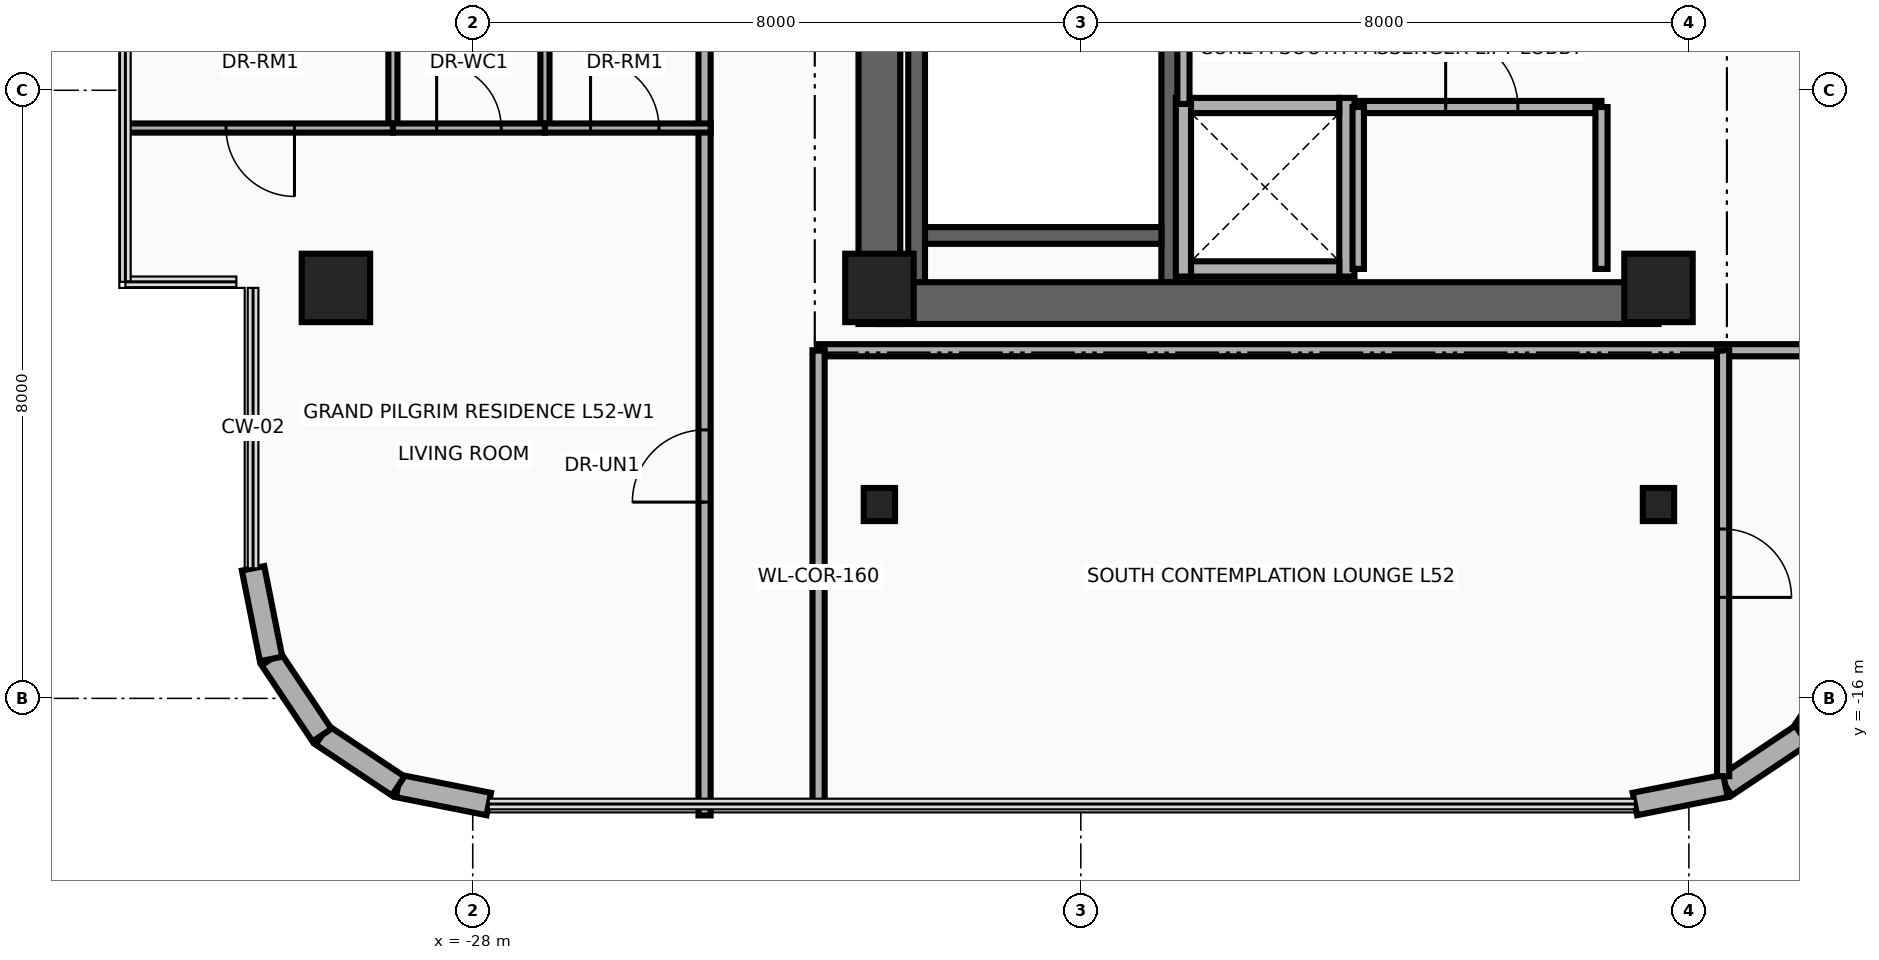
"""IFC4 building model, lengths in metres.
Left out: names, types, materials, properties, quantities, classifications, styles, units other than length and angle.
Written with IfcOpenShell. Run it as: python <this file> out.ifc"""

import sys

from ifc_helpers import new_model, si_unit, direction, frame, frame_2d, origin, origin_2d, place, context, subcontext, project, spatial, rectangle, i_section, extrude, source, transform, mapped, element, fill, save


model = new_model("IFC4")
c1 = context("Model", 3, precision=1e-05, world=origin(), true_north=direction((0.0, 1.0)))
c2 = subcontext(c1, "Body", "Model", "MODEL_VIEW")
j1 = project(units=[si_unit("LENGTHUNIT", "METRE"), si_unit("PLANEANGLEUNIT", "RADIAN")], contexts=[c1])
p1 = place(None, origin())
s1 = spatial("IfcSite", under=j1, at=p1, CompositionType="ELEMENT")
p2 = place(p1, origin())
s2 = spatial("IfcBuilding", under=s1, at=p2, CompositionType="ELEMENT")
p3 = place(p2, frame((0.0, 0.0, 205.5)))
s3 = spatial("IfcBuildingStorey", under=s2, at=p3, CompositionType="ELEMENT", Elevation=205.5)
for number, where, z_axis, x_axis in (
    (1, (-22.16, -10.525, 0.0), (0.0, 0.0, 1.0), (0.0, 1.0, 0.0)),
    (2, (-18.83, -10.525, 0.0), (0.0, 0.0, 1.0), (0.0, 1.0, 0.0)),
):
    element("IfcWall", number, at=place(p3, frame(where, z_axis=z_axis, x_axis=x_axis)), inside=s3, PredefinedType="SHEAR", context=c2, shape_type="SweptSolid", body=[
        extrude(rectangle(XDim=8.745, YDim=0.22, at=frame_2d((4.373, 0.0))), origin(), (0.0, 0.0, 1.0), 3.26),
    ])
p4 = place(p3, frame((-22.05, -9.91, 0.0), z_axis=(0.0, 0.0, 1.0), x_axis=(1.0, 0.0, 0.0)))
e3 = element("IfcWall", 3, at=p4, inside=s3, PredefinedType="SHEAR", context=c2, shape_type="SweptSolid", body=[
    extrude(rectangle(XDim=3.11, YDim=0.22, at=frame_2d((1.555, 0.0))), origin(), (0.0, 0.0, 1.0), 3.26),
])
p5 = place(p3, frame((-22.65, -11.075, 0.0), z_axis=(0.0, 0.0, 1.0), x_axis=(0.0, 1.0, 0.0)))
e4 = element("IfcWall", 4, at=p5, inside=s3, PredefinedType="SHEAR", context=c2, shape_type="SweptSolid", body=[
    extrude(rectangle(XDim=22.15, YDim=0.55, at=frame_2d((11.075, 0.0))), origin(), (0.0, 0.0, 1.0), 3.26),
])
p6 = place(p3, frame((-22.65, -10.8, 0.0), z_axis=(0.0, 0.0, 1.0), x_axis=(1.0, 0.0, 0.0)))
e5 = element("IfcWall", 5, at=p6, inside=s3, PredefinedType="SHEAR", context=c2, shape_type="SweptSolid", body=[
    extrude(rectangle(XDim=10.25, YDim=0.55, at=frame_2d((5.125, 0.0))), origin(), (0.0, 0.0, 1.0), 3.26),
])
m1 = source(origin(), c2, "Body", "SweptSolid", [
    extrude(rectangle(XDim=0.9, YDim=0.9, at=origin_2d()), origin(), (0.0, 0.0, 1.0), 3.5),
])
for number, where, z_axis, x_axis in (
    (6, (-29.8, -10.6, 0.0), (0.0, 0.0, 1.0), (1.0, 0.0, 0.0)),
    (7, (-22.65, -10.6, 0.0), (0.0, 0.0, 1.0), (1.0, 0.0, 0.0)),
    (8, (-12.4, -10.6, 0.0), (0.0, 0.0, 1.0), (1.0, 0.0, 0.0)),
):
    element("IfcColumn", number, at=place(p3, frame(where, z_axis=z_axis, x_axis=x_axis)), inside=s3, PredefinedType="COLUMN", context=c2, shape_type="MappedRepresentation", body=[
        mapped(m1, transform((0.0, 0.0, 0.0), x_axis=(1.0, 0.0, 0.0), y_axis=(0.0, 1.0, 0.0), z_axis=(0.0, 0.0, 1.0), scale=1.0)),
    ])
m2 = source(origin(), c2, "Body", "SweptSolid", [
    extrude(i_section(OverallWidth=0.412, OverallDepth=0.435, WebThickness=0.036, FlangeThickness=0.057, at=origin_2d()), origin(), (0.0, 0.0, 1.0), 3.5),
])
for number, where, z_axis, x_axis in (
    (9, (-22.65, -13.45, 0.0), (0.0, 0.0, 1.0), (1.0, 0.0, 0.0)),
    (10, (-12.4, -13.45, 0.0), (0.0, 0.0, 1.0), (1.0, 0.0, 0.0)),
):
    element("IfcColumn", number, at=place(p3, frame(where, z_axis=z_axis, x_axis=x_axis)), inside=s3, PredefinedType="COLUMN", context=c2, shape_type="MappedRepresentation", body=[
        mapped(m2, transform((0.0, 0.0, 0.0), x_axis=(1.0, 0.0, 0.0), y_axis=(0.0, 1.0, 0.0), z_axis=(0.0, 0.0, 1.0), scale=1.0)),
    ])
for number, where, z_axis, x_axis in (
    (11, (-9.847, -15.482, 0.0), (0.0, 0.0, 1.0), (-0.556, -0.831, 0.0)),
    (12, (-10.517, -16.483, 0.0), (0.0, 0.0, 1.0), (-0.831, -0.556, 0.0)),
):
    element("IfcWall", number, at=place(p3, frame(where, z_axis=z_axis, x_axis=x_axis)), inside=s3, PredefinedType="SOLIDWALL", context=c2, shape_type="SweptSolid", body=[
        extrude(rectangle(XDim=1.205, YDim=0.3, at=frame_2d((0.603, 0.0))), origin(), (0.0, 0.0, 1.0), 3.26),
    ])
for number, where, z_axis, x_axis in (
    (13, (-11.518, -17.153, 0.0), (0.0, 0.0, 1.0), (-0.981, -0.195, 0.0)),
    (14, (-27.789, -17.39, 0.0), (0.0, 0.0, 1.0), (-0.981, 0.195, 0.0)),
):
    element("IfcWall", number, at=place(p3, frame(where, z_axis=z_axis, x_axis=x_axis)), inside=s3, PredefinedType="SOLIDWALL", context=c2, shape_type="SweptSolid", body=[
        extrude(rectangle(XDim=1.216, YDim=0.3, at=frame_2d((0.608, 0.0))), origin(), (0.0, 0.0, 1.0), 3.26),
    ])
for number, where, z_axis, x_axis in (
    (15, (-28.982, -17.153, 0.0), (0.0, 0.0, 1.0), (-0.831, 0.556, 0.0)),
    (16, (-29.983, -16.483, 0.0), (0.0, 0.0, 1.0), (-0.556, 0.831, 0.0)),
):
    element("IfcWall", number, at=place(p3, frame(where, z_axis=z_axis, x_axis=x_axis)), inside=s3, PredefinedType="SOLIDWALL", context=c2, shape_type="SweptSolid", body=[
        extrude(rectangle(XDim=1.205, YDim=0.3, at=frame_2d((0.603, 0.0))), origin(), (0.0, 0.0, 1.0), 3.26),
    ])
p7 = place(p3, frame((-30.653, -15.482, 0.0), z_axis=(0.0, 0.0, 1.0), x_axis=(-0.194996050505, 0.980804027463, 0.0)))
e17 = element("IfcWall", 17, at=p7, inside=s3, PredefinedType="SOLIDWALL", context=c2, shape_type="SweptSolid", body=[
    extrude(rectangle(XDim=1.216, YDim=0.3, at=frame_2d((0.608, 0.0))), origin(), (0.0, 0.0, 1.0), 3.26),
])
for number, where, z_axis, x_axis in (
    (18, (-18.65, -10.45, 0.0), (0.0, 0.0, 1.0), (0.0, 1.0, 0.0)),
    (19, (-16.5, -10.45, 0.0), (0.0, 0.0, 1.0), (0.0, 1.0, 0.0)),
):
    element("IfcWall", number, at=place(p3, frame(where, z_axis=z_axis, x_axis=x_axis)), inside=s3, PredefinedType="MOVABLE", context=c2, shape_type="SweptSolid", body=[
        extrude(rectangle(XDim=2.35, YDim=0.2, at=frame_2d((1.175, 0.0))), origin(), (0.0, 0.0, 1.0), 2.544),
    ])
p8 = place(p3, frame((-18.55, -10.35, 0.0), z_axis=(0.0, 0.0, 1.0), x_axis=(1.0, 0.0, 0.0)))
e20 = element("IfcWall", 20, at=p8, inside=s3, PredefinedType="MOVABLE", context=c2, shape_type="SweptSolid", body=[
    extrude(rectangle(XDim=1.95, YDim=0.2, at=frame_2d((0.975, 0.0))), origin(), (0.0, 0.0, 1.0), 2.544),
])
p9 = place(p3, frame((-18.55, -8.2, 0.0), z_axis=(0.0, 0.0, 1.0), x_axis=(1.0, 0.0, 0.0)))
e21 = element("IfcWall", 21, at=p9, inside=s3, PredefinedType="MOVABLE", context=c2, shape_type="SweptSolid", body=[
    extrude(rectangle(XDim=1.95, YDim=0.2, at=frame_2d((0.975, 0.0))), origin(), (0.0, 0.0, 1.0), 3.26),
])
p10 = place(p3, frame((-18.65, -8.18, 0.0), z_axis=(0.0, 0.0, 1.0), x_axis=(0.0, 1.0, 0.0)))
e22 = element("IfcWall", 22, at=p10, inside=s3, PredefinedType="PARTITIONING", context=c2, shape_type="SweptSolid", body=[
    extrude(rectangle(XDim=1.56, YDim=0.16, at=frame_2d((0.78, 0.0))), origin(), (0.0, 0.0, 1.0), 3.26),
])
p11 = place(p3, frame((-16.35, -8.22, 0.0), z_axis=(0.0, 0.0, 1.0), x_axis=(1.0, 0.0, 0.0)))
e23 = element("IfcWall", 23, at=p11, inside=s3, PredefinedType="PARTITIONING", context=c2, shape_type="SweptSolid", body=[
    extrude(rectangle(XDim=3.2, YDim=0.16, at=frame_2d((1.6, 0.0))), origin(), (0.0, 0.0, 1.0), 3.26),
])
p12 = place(p11, frame((1.15, 0.0, 0.0)))
e24 = element("IfcOpeningElement", 24, at=p12, cuts=e23, PredefinedType="OPENING", context=c2, shape_type="SweptSolid", body=[
    extrude(rectangle(XDim=0.95, YDim=2.15, at=frame_2d((0.475, 1.075))), frame((0.0, 0.095, 0.0), z_axis=(0.0, -1.0, 0.0), x_axis=(1.0, 0.0, 0.0)), (0.0, 0.0, 1.0), 0.19),
])
p13 = place(p3, frame((-16.35, -10.35, 0.0), z_axis=(0.0, 0.0, 1.0), x_axis=(0.0, 1.0, 0.0)))
e25 = element("IfcWall", 25, at=p13, inside=s3, PredefinedType="PARTITIONING", context=c2, shape_type="SweptSolid", body=[
    extrude(rectangle(XDim=2.13, YDim=0.15, at=frame_2d((1.065, 0.0))), origin(), (0.0, 0.0, 1.0), 3.26),
])
p14 = place(p3, frame((-13.15, -10.35, 0.0), z_axis=(0.0, 0.0, 1.0), x_axis=(0.0, 1.0, 0.0)))
e26 = element("IfcWall", 26, at=p14, inside=s3, PredefinedType="PARTITIONING", context=c2, shape_type="SweptSolid", body=[
    extrude(rectangle(XDim=2.13, YDim=0.16, at=frame_2d((1.065, 0.0))), origin(), (0.0, 0.0, 1.0), 3.26),
])
p15 = place(p3, frame((-23.45, -11.42, 0.0), z_axis=(0.0, 0.0, 1.0), x_axis=(1.0, 0.0, 0.0)))
e27 = element("IfcWall", 27, at=p15, inside=s3, PredefinedType="PARTITIONING", context=c2, shape_type="SweptSolid", body=[
    extrude(rectangle(XDim=13.84, YDim=0.16, at=frame_2d((6.92, 0.0))), origin(), (0.0, 0.0, 1.0), 2.634),
])
p16 = place(p3, frame((-23.45, -17.39, 0.0), z_axis=(0.0, 0.0, 1.0), x_axis=(0.0, 1.0, 0.0)))
e28 = element("IfcWall", 28, at=p16, inside=s3, PredefinedType="PARTITIONING", context=c2, shape_type="SweptSolid", body=[
    extrude(rectangle(XDim=5.97, YDim=0.16, at=frame_2d((2.985, 0.0))), origin(), (0.0, 0.0, 1.0), 3.26),
])
p17 = place(p3, frame((-24.95, -17.54, 0.0), z_axis=(0.0, 0.0, 1.0), x_axis=(0.0, 1.0, 0.0)))
e29 = element("IfcWall", 29, at=p17, inside=s3, PredefinedType="PARTITIONING", context=c2, shape_type="SweptSolid", body=[
    extrude(rectangle(XDim=26.34, YDim=0.16, at=frame_2d((13.17, 0.0))), origin(), (0.0, 0.0, 1.0), 2.544),
])
p18 = place(p17, frame((4.122, 0.0, 0.0)))
e30 = element("IfcOpeningElement", 30, at=p18, cuts=e29, PredefinedType="OPENING", context=c2, shape_type="SweptSolid", body=[
    extrude(rectangle(XDim=0.95, YDim=2.15, at=frame_2d((0.475, 1.075))), frame((0.0, 0.095, 0.0), z_axis=(0.0, -1.0, 0.0), x_axis=(1.0, 0.0, 0.0)), (0.0, 0.0, 1.0), 0.19),
])
p19 = place(p17, frame((18.383, 0.0, 0.0)))
e31 = element("IfcOpeningElement", 31, at=p19, cuts=e29, PredefinedType="OPENING", context=c2, shape_type="SweptSolid", body=[
    extrude(rectangle(XDim=0.9, YDim=2.1, at=frame_2d((0.45, 1.05))), frame((0.0, 0.095, 0.0), z_axis=(0.0, -1.0, 0.0), x_axis=(1.0, 0.0, 0.0)), (0.0, 0.0, 1.0), 0.19),
])
p20 = place(p17, frame((23.388, 0.0, 0.0)))
e32 = element("IfcOpeningElement", 32, at=p20, cuts=e29, PredefinedType="OPENING", context=c2, shape_type="SweptSolid", body=[
    extrude(rectangle(XDim=0.9, YDim=2.1, at=frame_2d((0.45, 1.05))), frame((0.0, 0.095, 0.0), z_axis=(0.0, -1.0, 0.0), x_axis=(1.0, 0.0, 0.0)), (0.0, 0.0, 1.0), 0.19),
])
for number, where, z_axis, x_axis in (
    (33, (-27.05, -8.497, 0.0), (0.0, 0.0, 1.0), (0.0, 1.0, 0.0)),
    (34, (-29.05, -8.497, 0.0), (0.0, 0.0, 1.0), (0.0, 1.0, 0.0)),
):
    element("IfcWall", number, at=place(p3, frame(where, z_axis=z_axis, x_axis=x_axis)), inside=s3, PredefinedType="PARTITIONING", context=c2, shape_type="SweptSolid", body=[
        extrude(rectangle(XDim=7.288, YDim=0.12, at=frame_2d((3.644, 0.0))), origin(), (0.0, 0.0, 1.0), 2.544),
    ])
p21 = place(p3, frame((-29.05, -8.497, 0.0), z_axis=(0.0, 0.0, 1.0), x_axis=(1.0, 0.0, 0.0)))
e35 = element("IfcWall", 35, at=p21, inside=s3, PredefinedType="PARTITIONING", context=c2, shape_type="SweptSolid", body=[
    extrude(rectangle(XDim=2.0, YDim=0.12, at=frame_2d((1.0, 0.0))), origin(), (0.0, 0.0, 1.0), 2.788),
])
p22 = place(p21, frame((0.575, 0.0, 0.0)))
e36 = element("IfcOpeningElement", 36, at=p22, cuts=e35, PredefinedType="OPENING", context=c2, shape_type="SweptSolid", body=[
    extrude(rectangle(XDim=0.85, YDim=2.1, at=frame_2d((0.425, 1.05))), frame((0.0, 0.075, 0.0), z_axis=(0.0, -1.0, 0.0), x_axis=(1.0, 0.0, 0.0)), (0.0, 0.0, 1.0), 0.15),
])
p23 = place(p3, frame((-27.05, -8.497, 0.0), z_axis=(0.0, 0.0, 1.0), x_axis=(1.0, 0.0, 0.0)))
e37 = element("IfcWall", 37, at=p23, inside=s3, PredefinedType="PARTITIONING", context=c2, shape_type="SweptSolid", body=[
    extrude(rectangle(XDim=2.18, YDim=0.12, at=frame_2d((1.09, 0.0))), origin(), (0.0, 0.0, 1.0), 2.788),
])
p24 = place(p23, frame((0.6, 0.0, 0.0)))
e38 = element("IfcOpeningElement", 38, at=p24, cuts=e37, PredefinedType="OPENING", context=c2, shape_type="SweptSolid", body=[
    extrude(rectangle(XDim=0.9, YDim=2.1, at=frame_2d((0.45, 1.05))), frame((0.0, 0.075, 0.0), z_axis=(0.0, -1.0, 0.0), x_axis=(1.0, 0.0, 0.0)), (0.0, 0.0, 1.0), 0.15),
])
p25 = place(p3, frame((-32.54, -8.497, 0.0), z_axis=(0.0, 0.0, 1.0), x_axis=(1.0, 0.0, 0.0)))
e39 = element("IfcWall", 39, at=p25, inside=s3, PredefinedType="PARTITIONING", context=c2, shape_type="SweptSolid", body=[
    extrude(rectangle(XDim=3.49, YDim=0.12, at=frame_2d((1.745, 0.0))), origin(), (0.0, 0.0, 1.0), 2.706),
])
p26 = place(p25, frame((1.295, 0.0, 0.0)))
e40 = element("IfcOpeningElement", 40, at=p26, cuts=e39, PredefinedType="OPENING", context=c2, shape_type="SweptSolid", body=[
    extrude(rectangle(XDim=0.9, YDim=2.1, at=frame_2d((0.45, 1.05))), frame((0.0, 0.075, 0.0), z_axis=(0.0, -1.0, 0.0), x_axis=(1.0, 0.0, 0.0)), (0.0, 0.0, 1.0), 0.15),
])
p27 = place(p3, frame((-11.55, -17.024, 0.0), z_axis=(0.0, 0.0, 1.0), x_axis=(0.0, 1.0, 0.0)))
e41 = element("IfcWall", 41, at=p27, inside=s3, PredefinedType="PARTITIONING", context=c2, shape_type="SweptSolid", body=[
    extrude(rectangle(XDim=5.604, YDim=0.16, at=frame_2d((2.802, 0.0))), origin(), (0.0, 0.0, 1.0), 3.26),
])
p28 = place(p27, frame((2.352, 0.0, 0.0)))
e42 = element("IfcOpeningElement", 42, at=p28, cuts=e41, PredefinedType="OPENING", context=c2, shape_type="SweptSolid", body=[
    extrude(rectangle(XDim=0.9, YDim=2.1, at=frame_2d((0.45, 1.05))), frame((0.0, 0.095, 0.0), z_axis=(0.0, -1.0, 0.0), x_axis=(1.0, 0.0, 0.0)), (0.0, 0.0, 1.0), 0.19),
])
p29 = place(p12, origin())
e43 = element("IfcDoor", 43, at=p29, inside=s3, OperationType="SINGLE_SWING_LEFT", PredefinedType="DOOR", context=c2, shape_type="SweptSolid", body=[
    extrude(rectangle(XDim=0.95, YDim=2.15, at=frame_2d((0.475, 1.075))), frame((0.0, 0.025, 0.0), z_axis=(0.0, -1.0, 0.0), x_axis=(1.0, 0.0, 0.0)), (0.0, 0.0, 1.0), 0.05),
])
fill(e24, e43)
p30 = place(p18, origin())
e44 = element("IfcDoor", 44, at=p30, inside=s3, OperationType="SINGLE_SWING_RIGHT", PredefinedType="DOOR", context=c2, shape_type="SweptSolid", body=[
    extrude(rectangle(XDim=0.95, YDim=2.15, at=frame_2d((0.475, 1.075))), frame((0.0, 0.025, 0.0), z_axis=(0.0, -1.0, 0.0), x_axis=(1.0, 0.0, 0.0)), (0.0, 0.0, 1.0), 0.05),
])
fill(e30, e44)
p31 = place(p22, origin())
e45 = element("IfcDoor", 45, at=p31, inside=s3, OperationType="SINGLE_SWING_LEFT", PredefinedType="DOOR", context=c2, shape_type="SweptSolid", body=[
    extrude(rectangle(XDim=0.85, YDim=2.1, at=frame_2d((0.425, 1.05))), frame((0.0, 0.025, 0.0), z_axis=(0.0, -1.0, 0.0), x_axis=(1.0, 0.0, 0.0)), (0.0, 0.0, 1.0), 0.05),
])
fill(e36, e45)
p32 = place(p24, origin())
e46 = element("IfcDoor", 46, at=p32, inside=s3, OperationType="SINGLE_SWING_RIGHT", PredefinedType="DOOR", context=c2, shape_type="SweptSolid", body=[
    extrude(rectangle(XDim=0.9, YDim=2.1, at=frame_2d((0.45, 1.05))), frame((0.0, 0.025, 0.0), z_axis=(0.0, -1.0, 0.0), x_axis=(1.0, 0.0, 0.0)), (0.0, 0.0, 1.0), 0.05),
])
fill(e38, e46)
p33 = place(p26, frame((0.9, 0.0, 0.0), z_axis=(0.0, 0.0, 1.0), x_axis=(-1.0, 0.0, 0.0)))
e47 = element("IfcDoor", 47, at=p33, inside=s3, OperationType="SINGLE_SWING_LEFT", PredefinedType="DOOR", context=c2, shape_type="SweptSolid", body=[
    extrude(rectangle(XDim=0.9, YDim=2.1, at=frame_2d((0.45, 1.05))), frame((0.0, 0.025, 0.0), z_axis=(0.0, -1.0, 0.0), x_axis=(1.0, 0.0, 0.0)), (0.0, 0.0, 1.0), 0.05),
])
fill(e40, e47)
p34 = place(p28, frame((0.9, 0.0, 0.0), z_axis=(0.0, 0.0, 1.0), x_axis=(-1.0, 0.0, 0.0)))
e48 = element("IfcDoor", 48, at=p34, inside=s3, OperationType="SINGLE_SWING_LEFT", PredefinedType="DOOR", context=c2, shape_type="SweptSolid", body=[
    extrude(rectangle(XDim=0.9, YDim=2.1, at=frame_2d((0.45, 1.05))), frame((0.0, 0.025, 0.0), z_axis=(0.0, -1.0, 0.0), x_axis=(1.0, 0.0, 0.0)), (0.0, 0.0, 1.0), 0.05),
])
fill(e42, e48)
save(model, sys.argv[1])
